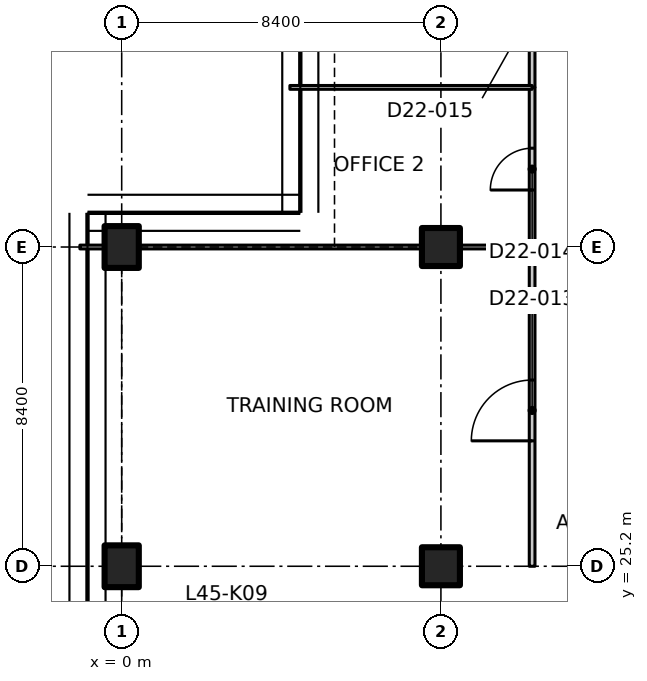
"""IFC4 building model, lengths in metres.
Left out: names, types, materials, properties, quantities, classifications, styles, units other than length and angle.
Written with IfcOpenShell. Run it as: python <this file> out.ifc"""

import sys

from ifc_helpers import new_model, si_unit, direction, frame, frame_2d, origin, origin_2d, place, context, subcontext, project, spatial, polyline, rectangle, outline, extrude, element, fill, save


model = new_model("IFC4")
c1 = context("Model", 3, precision=1e-05, world=origin(), true_north=direction((0.0, 1.0)))
c2 = subcontext(c1, "Body", "Model", "MODEL_VIEW")
j1 = project(units=[si_unit("LENGTHUNIT", "METRE"), si_unit("PLANEANGLEUNIT", "RADIAN")], contexts=[c1])
p1 = place(None, origin())
s1 = spatial("IfcSite", under=j1, at=p1, CompositionType="ELEMENT")
p2 = place(p1, origin())
s2 = spatial("IfcBuilding", under=s1, at=p2, CompositionType="ELEMENT")
p3 = place(p2, frame((0.0, 0.0, 181.2)))
s3 = spatial("IfcBuildingStorey", under=s2, at=p3, CompositionType="ELEMENT", Elevation=181.2)
for number, where, z_axis, x_axis in (
    (1, (0.0, 25.2, 0.0), (0.0, 0.0, 1.0), (1.0, 0.0, 0.0)),
    (2, (0.0, 33.6, 0.0), (0.0, 0.0, 1.0), (1.0, 0.0, 0.0)),
):
    element("IfcColumn", number, at=place(p3, frame(where, z_axis=z_axis, x_axis=x_axis)), inside=s3, PredefinedType="COLUMN", context=c2, shape_type="SweptSolid", body=[
        extrude(rectangle(XDim=0.9, YDim=1.1, at=origin_2d()), origin(), (0.0, 0.0, 1.0), 3.35),
    ])
for number, where, z_axis, x_axis in (
    (3, (8.4, 25.2, 0.0), (0.0, 0.0, 1.0), (1.0, 0.0, 0.0)),
    (4, (8.4, 33.6, 0.0), (0.0, 0.0, 1.0), (1.0, 0.0, 0.0)),
):
    element("IfcColumn", number, at=place(p3, frame(where, z_axis=z_axis, x_axis=x_axis)), inside=s3, PredefinedType="COLUMN", context=c2, shape_type="SweptSolid", body=[
        extrude(rectangle(XDim=1.0, YDim=1.0, at=origin_2d()), origin(), (0.0, 0.0, 1.0), 3.35),
    ])
p4 = place(p3, frame((10.8, 25.2, 0.0), z_axis=(0.0, 0.0, 1.0), x_axis=(0.0, 1.0, 0.0)))
e5 = element("IfcWall", 5, at=p4, inside=s3, PredefinedType="PARTITIONING", context=c2, shape_type="SweptSolid", body=[
    extrude(rectangle(XDim=8.4, YDim=0.15, at=frame_2d((4.2, 0.0))), origin(), (0.0, 0.0, 1.0), 3.33),
])
p5 = place(p4, frame((3.3, 0.0, 0.0)))
e6 = element("IfcOpeningElement", 6, at=p5, cuts=e5, PredefinedType="OPENING", context=c2, shape_type="SweptSolid", body=[
    extrude(rectangle(XDim=1.6, YDim=2.1, at=frame_2d((0.8, 1.05))), frame((0.0, 0.085, 0.0), z_axis=(0.0, -1.0, 0.0), x_axis=(1.0, 0.0, 0.0)), (0.0, 0.0, 1.0), 0.17),
])
p6 = place(p3, frame((10.8, 33.6, 0.0), z_axis=(0.0, 0.0, 1.0), x_axis=(0.0, 1.0, 0.0)))
e7 = element("IfcWall", 7, at=p6, inside=s3, PredefinedType="PARTITIONING", context=c2, shape_type="SweptSolid", body=[
    extrude(rectangle(XDim=4.2, YDim=0.15, at=frame_2d((2.1, 0.0))), origin(), (0.0, 0.0, 1.0), 3.33),
])
p7 = place(p6, frame((1.5, 0.0, 0.0)))
e8 = element("IfcOpeningElement", 8, at=p7, cuts=e7, PredefinedType="OPENING", context=c2, shape_type="SweptSolid", body=[
    extrude(rectangle(XDim=1.1, YDim=2.1, at=frame_2d((0.55, 1.05))), frame((0.0, 0.085, 0.0), z_axis=(0.0, -1.0, 0.0), x_axis=(1.0, 0.0, 0.0)), (0.0, 0.0, 1.0), 0.17),
])
p8 = place(p3, frame((10.8, 37.8, 0.0), z_axis=(0.0, 0.0, 1.0), x_axis=(0.0, 1.0, 0.0)))
e9 = element("IfcWall", 9, at=p8, inside=s3, PredefinedType="PARTITIONING", context=c2, shape_type="SweptSolid", body=[
    extrude(rectangle(XDim=4.2, YDim=0.15, at=frame_2d((2.1, 0.0))), origin(), (0.0, 0.0, 1.0), 3.33),
])
p9 = place(p8, frame((1.5, 0.0, 0.0)))
e10 = element("IfcOpeningElement", 10, at=p9, cuts=e9, PredefinedType="OPENING", context=c2, shape_type="SweptSolid", body=[
    extrude(rectangle(XDim=1.1, YDim=2.1, at=frame_2d((0.55, 1.05))), frame((0.0, 0.085, 0.0), z_axis=(0.0, -1.0, 0.0), x_axis=(1.0, 0.0, 0.0)), (0.0, 0.0, 1.0), 0.17),
])
p10 = place(p3, frame((-1.1, 33.6, 0.0), z_axis=(0.0, 0.0, 1.0), x_axis=(1.0, 0.0, 0.0)))
e11 = element("IfcWall", 11, at=p10, inside=s3, PredefinedType="PARTITIONING", context=c2, shape_type="SweptSolid", body=[
    extrude(rectangle(XDim=0.63, YDim=0.1, at=frame_2d((0.315, 0.0))), origin(), (0.0, 0.0, 1.0), 3.33),
])
p11 = place(p3, frame((0.47, 33.6, 0.0), z_axis=(0.0, 0.0, 1.0), x_axis=(1.0, 0.0, 0.0)))
e12 = element("IfcWall", 12, at=p11, inside=s3, PredefinedType="PARTITIONING", context=c2, shape_type="SweptSolid", body=[
    extrude(outline(polyline([(0.0, 0.0), (7.41, 0.0), (7.41, 2.98), (0.0, 2.98), (0.0, 0.0)])), frame((0.0, 0.05, 0.0), z_axis=(0.0, -1.0, 0.0), x_axis=(1.0, 0.0, 0.0)), (0.0, 0.0, 1.0), 0.1),
])
p12 = place(p3, frame((8.92, 33.6, 0.0), z_axis=(0.0, 0.0, 1.0), x_axis=(1.0, 0.0, 0.0)))
e13 = element("IfcWall", 13, at=p12, inside=s3, PredefinedType="PARTITIONING", context=c2, shape_type="SweptSolid", body=[
    extrude(rectangle(XDim=1.88, YDim=0.1, at=frame_2d((0.94, 0.0))), origin(), (0.0, 0.0, 1.0), 3.33),
])
p13 = place(p3, frame((4.426, 37.8, 0.0), z_axis=(0.0, 0.0, 1.0), x_axis=(1.0, 0.0, 0.0)))
e14 = element("IfcWall", 14, at=p13, inside=s3, PredefinedType="PARTITIONING", context=c2, shape_type="SweptSolid", body=[
    extrude(outline(polyline([(0.0, 0.0), (6.374, 0.0), (6.374, 3.33), (1.624, 3.33), (1.622, 2.98), (0.726, 2.98), (0.724, 3.33), (0.074, 3.33), (0.0, 3.33), (0.0, 0.0)])), frame((0.0, 0.05, 0.0), z_axis=(0.0, -1.0, 0.0), x_axis=(1.0, 0.0, 0.0)), (0.0, 0.0, 1.0), 0.1),
])
p14 = place(p5, origin())
e15 = element("IfcDoor", 15, at=p14, inside=s3, OperationType="DOUBLE_DOOR_SINGLE_SWING", PredefinedType="DOOR", context=c2, shape_type="SweptSolid", body=[
    extrude(rectangle(XDim=1.6, YDim=2.1, at=frame_2d((0.8, 1.05))), frame((0.0, 0.025, 0.0), z_axis=(0.0, -1.0, 0.0), x_axis=(1.0, 0.0, 0.0)), (0.0, 0.0, 1.0), 0.05),
])
fill(e6, e15)
p15 = place(p7, origin())
e16 = element("IfcDoor", 16, at=p15, inside=s3, OperationType="SINGLE_SWING_LEFT", PredefinedType="DOOR", context=c2, shape_type="SweptSolid", body=[
    extrude(rectangle(XDim=1.1, YDim=2.1, at=frame_2d((0.55, 1.05))), frame((0.0, 0.025, 0.0), z_axis=(0.0, -1.0, 0.0), x_axis=(1.0, 0.0, 0.0)), (0.0, 0.0, 1.0), 0.05),
])
fill(e8, e16)
save(model, sys.argv[1])
